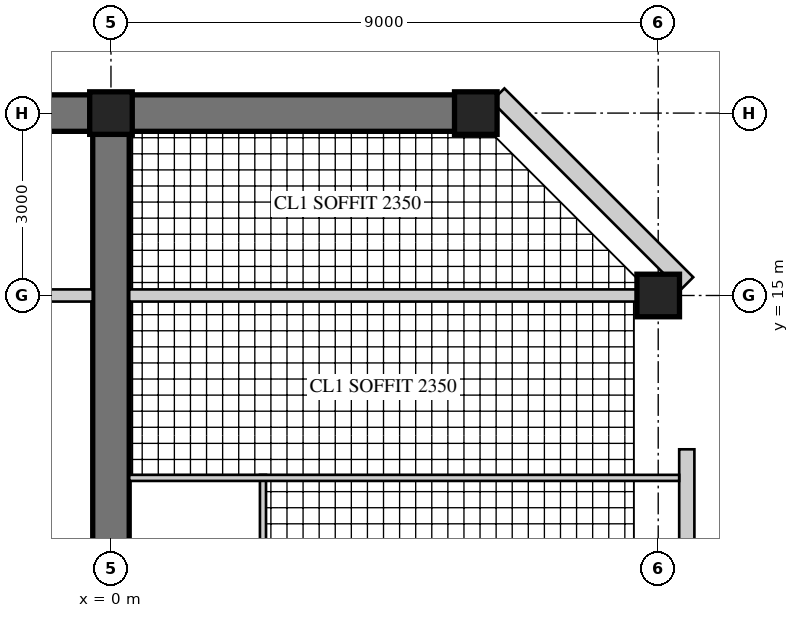
"""IFC4 building model, lengths in metres.
Left out: names, types, materials, properties, quantities, classifications, styles, units other than length and angle.
Written with IfcOpenShell. Run it as: python <this file> out.ifc"""

import sys

from ifc_helpers import new_model, si_unit, direction, frame, frame_2d, origin, origin_2d, place, context, subcontext, project, spatial, rectangle, hollow_rectangle, extrude, element, fill, save


model = new_model("IFC4")
c1 = context("Model", 3, precision=1e-05, world=origin(), true_north=direction((0.0, 1.0)))
c2 = subcontext(c1, "Body", "Model", "MODEL_VIEW")
j1 = project(units=[si_unit("LENGTHUNIT", "METRE"), si_unit("PLANEANGLEUNIT", "RADIAN")], contexts=[c1])
p1 = place(None, origin())
s1 = spatial("IfcSite", under=j1, at=p1, CompositionType="ELEMENT")
p2 = place(p1, origin())
s2 = spatial("IfcBuilding", under=s1, at=p2, CompositionType="ELEMENT")
p3 = place(p2, frame((0.0, 0.0, 261.1)))
s3 = spatial("IfcBuildingStorey", under=s2, at=p3, CompositionType="ELEMENT", Elevation=261.1)
p4 = place(p3, frame((0.0, 9.0, 0.0), z_axis=(0.0, 0.0, 1.0), x_axis=(0.0, 1.0, 0.0)))
e1 = element("IfcWall", 1, at=p4, inside=s3, PredefinedType="SHEAR", context=c2, shape_type="SweptSolid", body=[
    extrude(rectangle(XDim=9.0, YDim=0.6, at=frame_2d((4.5, 0.0))), origin(), (0.0, 0.0, 1.0), 3.4),
])
p5 = place(p4, frame((3.8, 0.0, 0.0)))
e2 = element("IfcOpeningElement", 2, at=p5, cuts=e1, PredefinedType="OPENING", context=c2, shape_type="SweptSolid", body=[
    extrude(rectangle(XDim=1.0, YDim=2.15, at=frame_2d((0.5, 1.075))), frame((0.0, 0.31, 0.0), z_axis=(0.0, -1.0, 0.0), x_axis=(1.0, 0.0, 0.0)), (0.0, 0.0, 1.0), 0.62),
])
p6 = place(p4, frame((7.0, 0.0, 0.0)))
e3 = element("IfcOpeningElement", 3, at=p6, cuts=e1, PredefinedType="OPENING", context=c2, shape_type="SweptSolid", body=[
    extrude(rectangle(XDim=1.0, YDim=2.2, at=frame_2d((0.5, 1.1))), frame((0.0, 0.31, 0.0), z_axis=(0.0, -1.0, 0.0), x_axis=(1.0, 0.0, 0.0)), (0.0, 0.0, 1.0), 0.62),
])
p7 = place(p3, frame((6.0, 18.0, 0.0), z_axis=(0.0, 0.0, 1.0), x_axis=(-1.0, 0.0, 0.0)))
e4 = element("IfcWall", 4, at=p7, inside=s3, PredefinedType="SHEAR", context=c2, shape_type="SweptSolid", body=[
    extrude(rectangle(XDim=12.0, YDim=0.6, at=frame_2d((6.0, 0.0))), origin(), (0.0, 0.0, 1.0), 3.4),
])
p8 = place(p7, frame((1.625, 0.0, 0.6)))
e5 = element("IfcOpeningElement", 5, at=p8, cuts=e4, PredefinedType="OPENING", context=c2, shape_type="SweptSolid", body=[
    extrude(rectangle(XDim=3.0, YDim=2.4, at=frame_2d((1.5, 1.2))), frame((0.0, 0.31, 0.0), z_axis=(0.0, -1.0, 0.0), x_axis=(1.0, 0.0, 0.0)), (0.0, 0.0, 1.0), 0.62),
])
p9 = place(p7, frame((7.375, 0.0, 0.6)))
e6 = element("IfcOpeningElement", 6, at=p9, cuts=e4, PredefinedType="OPENING", context=c2, shape_type="SweptSolid", body=[
    extrude(rectangle(XDim=3.0, YDim=2.4, at=frame_2d((1.5, 1.2))), frame((0.0, 0.31, 0.0), z_axis=(0.0, -1.0, 0.0), x_axis=(1.0, 0.0, 0.0)), (0.0, 0.0, 1.0), 0.62),
])
for number, where, z_axis, x_axis in (
    (7, (9.0, 15.0, 0.0), (0.0, 0.0, 1.0), (1.0, 0.0, 0.0)),
    (8, (6.0, 18.0, 0.0), (0.0, 0.0, 1.0), (1.0, 0.0, 0.0)),
    (9, (0.0, 18.0, 0.0), (0.0, 0.0, 1.0), (1.0, 0.0, 0.0)),
):
    element("IfcColumn", number, at=place(p3, frame(where, z_axis=z_axis, x_axis=x_axis)), inside=s3, PredefinedType="COLUMN", context=c2, shape_type="SweptSolid", body=[
        extrude(rectangle(XDim=0.7, YDim=0.7, at=origin_2d()), origin(), (0.0, 0.0, 1.0), 3.4),
    ])
p10 = place(p3, frame((9.47, 9.345, 0.0), z_axis=(0.0, 0.0, 1.0), x_axis=(0.0, 1.0, 0.0)))
e10 = element("IfcWall", 10, at=p10, inside=s3, PredefinedType="SOLIDWALL", context=c2, shape_type="SweptSolid", body=[
    extrude(rectangle(XDim=3.125, YDim=0.25, at=frame_2d((1.562, 0.0))), origin(), (0.0, 0.0, 1.0), 3.22),
])
p11 = place(p10, frame((0.6, 0.0, 0.0)))
e11 = element("IfcOpeningElement", 11, at=p11, cuts=e10, PredefinedType="OPENING", context=c2, shape_type="SweptSolid", body=[
    extrude(rectangle(XDim=1.0, YDim=2.2, at=frame_2d((0.5, 1.1))), frame((0.0, 0.135, 0.0), z_axis=(0.0, -1.0, 0.0), x_axis=(1.0, 0.0, 0.0)), (0.0, 0.0, 1.0), 0.27),
])
p12 = place(p3, frame((9.47, 15.195, 0.0), z_axis=(0.0, 0.0, 1.0), x_axis=(-0.70707898447, 0.707134576811, 0.0)))
e12 = element("IfcWall", 12, at=p12, inside=s3, PredefinedType="SOLIDWALL", context=c2, shape_type="SweptSolid", body=[
    extrude(rectangle(XDim=4.392, YDim=0.3, at=frame_2d((2.196, 0.0))), origin(), (0.0, 0.0, 1.0), 3.22),
])
p13 = place(p12, frame((1.746, 0.0, 0.3)))
e13 = element("IfcOpeningElement", 13, at=p13, cuts=e12, PredefinedType="OPENING", context=c2, shape_type="SweptSolid", body=[
    extrude(rectangle(XDim=0.9, YDim=2.4, at=frame_2d((0.45, 1.2))), frame((0.0, 0.16, 0.0), z_axis=(0.0, -1.0, 0.0), x_axis=(1.0, 0.0, 0.0)), (0.0, 0.0, 1.0), 0.32),
])
p14 = place(p3, frame((2.5, 9.4, 0.0), z_axis=(0.0, 0.0, 1.0), x_axis=(0.0, 1.0, 0.0)))
e14 = element("IfcWall", 14, at=p14, inside=s3, PredefinedType="PARTITIONING", context=c2, shape_type="SweptSolid", body=[
    extrude(rectangle(XDim=2.65, YDim=0.1, at=frame_2d((1.325, 0.0))), origin(), (0.0, 0.0, 1.0), 3.22),
])
p15 = place(p3, frame((9.345, 12.0, 0.0), z_axis=(0.0, 0.0, 1.0), x_axis=(-1.0, 0.0, 0.0)))
e15 = element("IfcWall", 15, at=p15, inside=s3, PredefinedType="PARTITIONING", context=c2, shape_type="SweptSolid", body=[
    extrude(rectangle(XDim=9.045, YDim=0.1, at=frame_2d((4.522, 0.0))), origin(), (0.0, 0.0, 1.0), 3.22),
])
p16 = place(p15, frame((5.495, 0.0, 0.0)))
e16 = element("IfcOpeningElement", 16, at=p16, cuts=e15, PredefinedType="OPENING", context=c2, shape_type="SweptSolid", body=[
    extrude(rectangle(XDim=0.9, YDim=2.1, at=frame_2d((0.45, 1.05))), frame((0.0, 0.06, 0.0), z_axis=(0.0, -1.0, 0.0), x_axis=(1.0, 0.0, 0.0)), (0.0, 0.0, 1.0), 0.12),
])
p17 = place(p15, frame((7.595, 0.0, 0.0)))
e17 = element("IfcOpeningElement", 17, at=p17, cuts=e15, PredefinedType="OPENING", context=c2, shape_type="SweptSolid", body=[
    extrude(rectangle(XDim=0.9, YDim=2.1, at=frame_2d((0.45, 1.05))), frame((0.0, 0.06, 0.0), z_axis=(0.0, -1.0, 0.0), x_axis=(1.0, 0.0, 0.0)), (0.0, 0.0, 1.0), 0.12),
])
p18 = place(p3, frame((8.65, 15.0, 0.0), z_axis=(0.0, 0.0, 1.0), x_axis=(-1.0, 0.0, 0.0)))
e18 = element("IfcWall", 18, at=p18, inside=s3, PredefinedType="SOLIDWALL", context=c2, shape_type="SweptSolid", body=[
    extrude(rectangle(XDim=8.35, YDim=0.2, at=frame_2d((4.175, 0.0))), origin(), (0.0, 0.0, 1.0), 2.52),
])
p19 = place(p3, frame((-0.3, 15.0, 0.0), z_axis=(0.0, 0.0, 1.0), x_axis=(-1.0, 0.0, 0.0)))
e19 = element("IfcWall", 19, at=p19, inside=s3, PredefinedType="SOLIDWALL", context=c2, shape_type="SweptSolid", body=[
    extrude(rectangle(XDim=8.35, YDim=0.2, at=frame_2d((4.175, 0.0))), origin(), (0.0, 0.0, 1.0), 2.52),
])
p20 = place(p19, frame((0.4, 0.0, 0.0)))
e20 = element("IfcOpeningElement", 20, at=p20, cuts=e19, PredefinedType="OPENING", context=c2, shape_type="SweptSolid", body=[
    extrude(rectangle(XDim=1.0, YDim=2.2, at=frame_2d((0.5, 1.1))), frame((0.0, 0.11, 0.0), z_axis=(0.0, -1.0, 0.0), x_axis=(1.0, 0.0, 0.0)), (0.0, 0.0, 1.0), 0.22),
])
p21 = place(p13, origin())
e21 = element("IfcWindow", 21, at=p21, inside=s3, PartitioningType="SINGLE_PANEL", PredefinedType="WINDOW", context=c2, shape_type="SweptSolid", body=[
    extrude(hollow_rectangle(XDim=0.9, YDim=2.4, WallThickness=0.06, at=frame_2d((0.45, 1.2))), frame((0.0, 0.03, 0.0), z_axis=(0.0, -1.0, 0.0), x_axis=(1.0, 0.0, 0.0)), (0.0, 0.0, 1.0), 0.06),
    extrude(rectangle(XDim=0.779, YDim=2.279, at=frame_2d((0.45, 1.2))), frame((0.0, 0.03, 0.0), z_axis=(0.0, -1.0, 0.0), x_axis=(1.0, 0.0, 0.0)), (0.0, 0.0, 1.0), 0.06),
])
fill(e13, e21)
p22 = place(p8, origin())
e22 = element("IfcWindow", 22, at=p22, inside=s3, PartitioningType="SINGLE_PANEL", PredefinedType="WINDOW", context=c2, shape_type="SweptSolid", body=[
    extrude(hollow_rectangle(XDim=3.0, YDim=2.4, WallThickness=0.06, at=frame_2d((1.5, 1.2))), frame((0.0, 0.03, 0.0), z_axis=(0.0, -1.0, 0.0), x_axis=(1.0, 0.0, 0.0)), (0.0, 0.0, 1.0), 0.06),
    extrude(rectangle(XDim=2.879, YDim=2.279, at=frame_2d((1.5, 1.2))), frame((0.0, 0.03, 0.0), z_axis=(0.0, -1.0, 0.0), x_axis=(1.0, 0.0, 0.0)), (0.0, 0.0, 1.0), 0.06),
])
fill(e5, e22)
p23 = place(p16, origin())
e23 = element("IfcDoor", 23, at=p23, inside=s3, OperationType="SINGLE_SWING_RIGHT", PredefinedType="DOOR", context=c2, shape_type="SweptSolid", body=[
    extrude(rectangle(XDim=0.9, YDim=2.1, at=frame_2d((0.45, 1.05))), frame((0.0, 0.025, 0.0), z_axis=(0.0, -1.0, 0.0), x_axis=(1.0, 0.0, 0.0)), (0.0, 0.0, 1.0), 0.05),
])
fill(e16, e23)
p24 = place(p17, origin())
e24 = element("IfcDoor", 24, at=p24, inside=s3, OperationType="SINGLE_SWING_RIGHT", PredefinedType="DOOR", context=c2, shape_type="SweptSolid", body=[
    extrude(rectangle(XDim=0.9, YDim=2.1, at=frame_2d((0.45, 1.05))), frame((0.0, 0.025, 0.0), z_axis=(0.0, -1.0, 0.0), x_axis=(1.0, 0.0, 0.0)), (0.0, 0.0, 1.0), 0.05),
])
fill(e17, e24)
p25 = place(p20, frame((1.0, 0.0, 0.0), z_axis=(0.0, 0.0, 1.0), x_axis=(-1.0, 0.0, 0.0)))
e25 = element("IfcDoor", 25, at=p25, inside=s3, OperationType="SINGLE_SWING_RIGHT", PredefinedType="DOOR", context=c2, shape_type="SweptSolid", body=[
    extrude(rectangle(XDim=1.0, YDim=2.2, at=frame_2d((0.5, 1.1))), frame((0.0, 0.025, 0.0), z_axis=(0.0, -1.0, 0.0), x_axis=(1.0, 0.0, 0.0)), (0.0, 0.0, 1.0), 0.05),
])
fill(e20, e25)
p26 = place(p5, frame((1.0, 0.0, 0.0), z_axis=(0.0, 0.0, 1.0), x_axis=(-1.0, 0.0, 0.0)))
e26 = element("IfcDoor", 26, at=p26, inside=s3, OperationType="SINGLE_SWING_RIGHT", PredefinedType="DOOR", context=c2, shape_type="SweptSolid", body=[
    extrude(rectangle(XDim=1.0, YDim=2.15, at=frame_2d((0.5, 1.075))), frame((0.0, 0.025, 0.0), z_axis=(0.0, -1.0, 0.0), x_axis=(1.0, 0.0, 0.0)), (0.0, 0.0, 1.0), 0.05),
])
fill(e2, e26)
p27 = place(p6, origin())
e27 = element("IfcDoor", 27, at=p27, inside=s3, OperationType="SINGLE_SWING_RIGHT", PredefinedType="DOOR", context=c2, shape_type="SweptSolid", body=[
    extrude(rectangle(XDim=1.0, YDim=2.2, at=frame_2d((0.5, 1.1))), frame((0.0, 0.025, 0.0), z_axis=(0.0, -1.0, 0.0), x_axis=(1.0, 0.0, 0.0)), (0.0, 0.0, 1.0), 0.05),
])
fill(e3, e27)
save(model, sys.argv[1])
